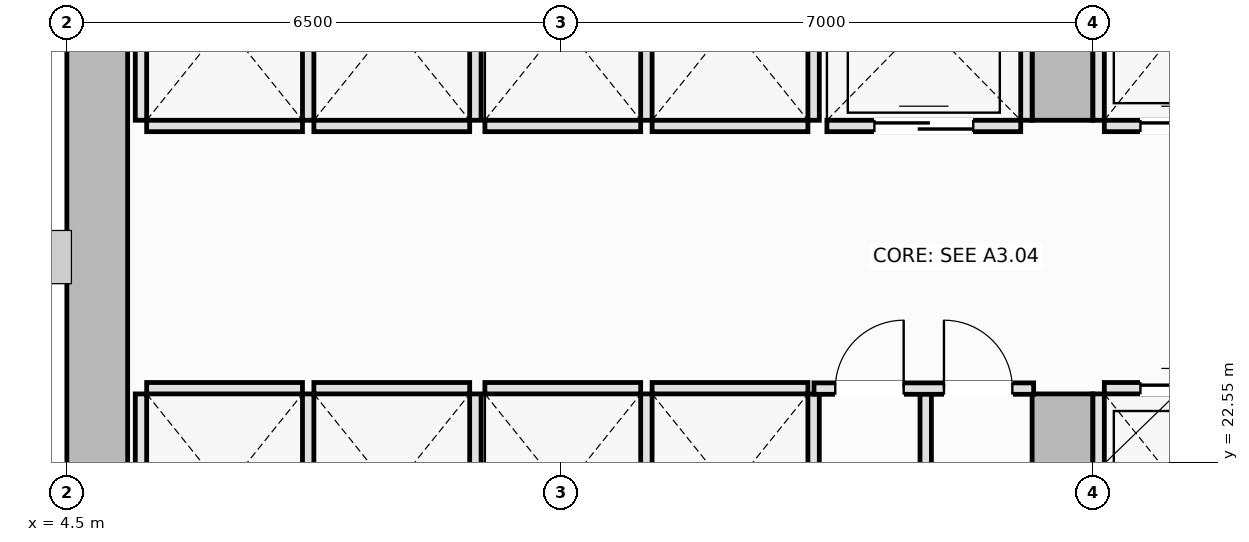
"""IFC4 building model, lengths in metres.
Left out: names, types, materials, properties, quantities, classifications, styles, units other than length and angle.
Written with IfcOpenShell. Run it as: python <this file> out.ifc"""

import sys

from ifc_helpers import new_model, si_unit, direction, frame, frame_2d, origin, place, context, subcontext, project, spatial, rectangle, extrude, element, fill, save


model = new_model("IFC4")
c1 = context("Model", 3, precision=1e-05, world=origin(), true_north=direction((0.0, 1.0)))
c2 = subcontext(c1, "Body", "Model", "MODEL_VIEW")
j1 = project(units=[si_unit("LENGTHUNIT", "METRE"), si_unit("PLANEANGLEUNIT", "RADIAN")], contexts=[c1])
p1 = place(None, origin())
s1 = spatial("IfcSite", under=j1, at=p1, CompositionType="ELEMENT")
p2 = place(p1, origin())
s2 = spatial("IfcBuilding", under=s1, at=p2, CompositionType="ELEMENT")
p3 = place(p2, frame((0.0, 0.0, 89.5)))
s3 = spatial("IfcBuildingStorey", under=s2, at=p3, CompositionType="ELEMENT", Elevation=89.5)
p4 = place(p3, frame((4.9, 14.8, 0.0), z_axis=(0.0, 0.0, 1.0), x_axis=(0.0, 1.0, 0.0)))
e1 = element("IfcWall", 1, at=p4, inside=s3, PredefinedType="SHEAR", context=c2, shape_type="SweptSolid", body=[
    extrude(rectangle(XDim=20.9, YDim=0.8, at=frame_2d((10.45, 0.0))), origin(), (0.0, 0.0, 1.0), 3.55),
])
p5 = place(p3, frame((17.6, 14.8, 0.0), z_axis=(0.0, 0.0, 1.0), x_axis=(0.0, 1.0, 0.0)))
e2 = element("IfcWall", 2, at=p5, inside=s3, PredefinedType="SHEAR", context=c2, shape_type="SweptSolid", body=[
    extrude(rectangle(XDim=8.65, YDim=0.8, at=frame_2d((4.325, 0.0))), origin(), (0.0, 0.0, 1.0), 3.55),
])
p6 = place(p5, frame((4.1, 0.0, 0.0)))
e3 = element("IfcOpeningElement", 3, at=p6, cuts=e2, PredefinedType="OPENING", context=c2, shape_type="SweptSolid", body=[
    extrude(rectangle(XDim=1.1, YDim=2.15, at=frame_2d((0.55, 1.075))), frame((0.0, 0.41, 0.0), z_axis=(0.0, -1.0, 0.0), x_axis=(1.0, 0.0, 0.0)), (0.0, 0.0, 1.0), 0.82),
])
p7 = place(p3, frame((17.6, 27.05, 0.0), z_axis=(0.0, 0.0, 1.0), x_axis=(0.0, 1.0, 0.0)))
e4 = element("IfcWall", 4, at=p7, inside=s3, PredefinedType="SHEAR", context=c2, shape_type="SweptSolid", body=[
    extrude(rectangle(XDim=8.65, YDim=0.8, at=frame_2d((4.325, 0.0))), origin(), (0.0, 0.0, 1.0), 3.55),
])
p8 = place(p7, frame((3.45, 0.0, 0.0)))
e5 = element("IfcOpeningElement", 5, at=p8, cuts=e4, PredefinedType="OPENING", context=c2, shape_type="SweptSolid", body=[
    extrude(rectangle(XDim=1.1, YDim=2.15, at=frame_2d((0.55, 1.075))), frame((0.0, 0.41, 0.0), z_axis=(0.0, -1.0, 0.0), x_axis=(1.0, 0.0, 0.0)), (0.0, 0.0, 1.0), 0.82),
])
p9 = place(p3, frame((18.15, 23.525, 0.0), z_axis=(0.0, 0.0, 1.0), x_axis=(1.0, 0.0, 0.0)))
e6 = element("IfcWall", 6, at=p9, inside=s3, PredefinedType="PARTITIONING", context=c2, shape_type="SweptSolid", body=[
    extrude(rectangle(XDim=2.05, YDim=0.15, at=frame_2d((1.025, 0.0))), origin(), (0.0, 0.0, 1.0), 3.35),
])
p10 = place(p9, frame((0.475, 0.0, 0.0)))
e7 = element("IfcOpeningElement", 7, at=p10, cuts=e6, PredefinedType="OPENING", context=c2, shape_type="SweptSolid", body=[
    extrude(rectangle(XDim=1.1, YDim=2.2, at=frame_2d((0.55, 1.1))), frame((0.0, 0.085, 0.0), z_axis=(0.0, -1.0, 0.0), x_axis=(1.0, 0.0, 0.0)), (0.0, 0.0, 1.0), 0.17),
])
p11 = place(p3, frame((18.075, 20.9, 0.0), z_axis=(0.0, 0.0, 1.0), x_axis=(0.0, 1.0, 0.0)))
e8 = element("IfcWall", 8, at=p11, inside=s3, PredefinedType="PARTITIONING", context=c2, shape_type="SweptSolid", body=[
    extrude(rectangle(XDim=2.55, YDim=0.15, at=frame_2d((1.275, 0.0))), origin(), (0.0, 0.0, 1.0), 3.35),
])
p12 = place(p3, frame((18.15, 26.975, 0.0), z_axis=(0.0, 0.0, 1.0), x_axis=(1.0, 0.0, 0.0)))
e9 = element("IfcWall", 9, at=p12, inside=s3, PredefinedType="PARTITIONING", context=c2, shape_type="SweptSolid", body=[
    extrude(rectangle(XDim=2.05, YDim=0.15, at=frame_2d((1.025, 0.0))), origin(), (0.0, 0.0, 1.0), 3.35),
])
p13 = place(p12, frame((0.475, 0.0, 0.0)))
e10 = element("IfcOpeningElement", 10, at=p13, cuts=e9, PredefinedType="OPENING", context=c2, shape_type="SweptSolid", body=[
    extrude(rectangle(XDim=1.1, YDim=2.2, at=frame_2d((0.55, 1.1))), frame((0.0, 0.085, 0.0), z_axis=(0.0, -1.0, 0.0), x_axis=(1.0, 0.0, 0.0)), (0.0, 0.0, 1.0), 0.17),
])
p14 = place(p3, frame((18.075, 27.05, 0.0), z_axis=(0.0, 0.0, 1.0), x_axis=(0.0, 1.0, 0.0)))
e11 = element("IfcWall", 11, at=p14, inside=s3, PredefinedType="PARTITIONING", context=c2, shape_type="SweptSolid", body=[
    extrude(rectangle(XDim=2.55, YDim=0.15, at=frame_2d((1.275, 0.0))), origin(), (0.0, 0.0, 1.0), 3.35),
])
p15 = place(p3, frame((5.55, 23.525, 0.0), z_axis=(0.0, 0.0, 1.0), x_axis=(1.0, 0.0, 0.0)))
e12 = element("IfcWall", 12, at=p15, inside=s3, PredefinedType="PARTITIONING", context=c2, shape_type="SweptSolid", body=[
    extrude(rectangle(XDim=2.05, YDim=0.15, at=frame_2d((1.025, 0.0))), origin(), (0.0, 0.0, 1.0), 3.35),
])
for number, where, z_axis, x_axis in (
    (13, (5.475, 20.9, 0.0), (0.0, 0.0, 1.0), (0.0, 1.0, 0.0)),
    (14, (7.675, 20.9, 0.0), (0.0, 0.0, 1.0), (0.0, 1.0, 0.0)),
):
    element("IfcWall", number, at=place(p3, frame(where, z_axis=z_axis, x_axis=x_axis)), inside=s3, PredefinedType="PARTITIONING", context=c2, shape_type="SweptSolid", body=[
        extrude(rectangle(XDim=2.55, YDim=0.15, at=frame_2d((1.275, 0.0))), origin(), (0.0, 0.0, 1.0), 3.35),
    ])
p16 = place(p3, frame((7.75, 23.525, 0.0), z_axis=(0.0, 0.0, 1.0), x_axis=(1.0, 0.0, 0.0)))
e15 = element("IfcWall", 15, at=p16, inside=s3, PredefinedType="PARTITIONING", context=c2, shape_type="SweptSolid", body=[
    extrude(rectangle(XDim=2.05, YDim=0.15, at=frame_2d((1.025, 0.0))), origin(), (0.0, 0.0, 1.0), 3.35),
])
p17 = place(p3, frame((9.875, 20.9, 0.0), z_axis=(0.0, 0.0, 1.0), x_axis=(0.0, 1.0, 0.0)))
e16 = element("IfcWall", 16, at=p17, inside=s3, PredefinedType="PARTITIONING", context=c2, shape_type="SweptSolid", body=[
    extrude(rectangle(XDim=2.55, YDim=0.15, at=frame_2d((1.275, 0.0))), origin(), (0.0, 0.0, 1.0), 3.35),
])
p18 = place(p3, frame((5.55, 26.975, 0.0), z_axis=(0.0, 0.0, 1.0), x_axis=(1.0, 0.0, 0.0)))
e17 = element("IfcWall", 17, at=p18, inside=s3, PredefinedType="PARTITIONING", context=c2, shape_type="SweptSolid", body=[
    extrude(rectangle(XDim=2.05, YDim=0.15, at=frame_2d((1.025, 0.0))), origin(), (0.0, 0.0, 1.0), 3.35),
])
for number, where, z_axis, x_axis in (
    (18, (5.475, 27.05, 0.0), (0.0, 0.0, 1.0), (0.0, 1.0, 0.0)),
    (19, (7.675, 27.05, 0.0), (0.0, 0.0, 1.0), (0.0, 1.0, 0.0)),
):
    element("IfcWall", number, at=place(p3, frame(where, z_axis=z_axis, x_axis=x_axis)), inside=s3, PredefinedType="PARTITIONING", context=c2, shape_type="SweptSolid", body=[
        extrude(rectangle(XDim=2.55, YDim=0.15, at=frame_2d((1.275, 0.0))), origin(), (0.0, 0.0, 1.0), 3.35),
    ])
p19 = place(p3, frame((7.75, 26.975, 0.0), z_axis=(0.0, 0.0, 1.0), x_axis=(1.0, 0.0, 0.0)))
e20 = element("IfcWall", 20, at=p19, inside=s3, PredefinedType="PARTITIONING", context=c2, shape_type="SweptSolid", body=[
    extrude(rectangle(XDim=2.05, YDim=0.15, at=frame_2d((1.025, 0.0))), origin(), (0.0, 0.0, 1.0), 3.35),
])
p20 = place(p3, frame((9.875, 27.05, 0.0), z_axis=(0.0, 0.0, 1.0), x_axis=(0.0, 1.0, 0.0)))
e21 = element("IfcWall", 21, at=p20, inside=s3, PredefinedType="PARTITIONING", context=c2, shape_type="SweptSolid", body=[
    extrude(rectangle(XDim=2.55, YDim=0.15, at=frame_2d((1.275, 0.0))), origin(), (0.0, 0.0, 1.0), 3.35),
])
p21 = place(p3, frame((10.0, 23.525, 0.0), z_axis=(0.0, 0.0, 1.0), x_axis=(1.0, 0.0, 0.0)))
e22 = element("IfcWall", 22, at=p21, inside=s3, PredefinedType="PARTITIONING", context=c2, shape_type="SweptSolid", body=[
    extrude(rectangle(XDim=2.05, YDim=0.15, at=frame_2d((1.025, 0.0))), origin(), (0.0, 0.0, 1.0), 3.35),
])
p22 = place(p3, frame((12.125, 20.9, 0.0), z_axis=(0.0, 0.0, 1.0), x_axis=(0.0, 1.0, 0.0)))
e23 = element("IfcWall", 23, at=p22, inside=s3, PredefinedType="PARTITIONING", context=c2, shape_type="SweptSolid", body=[
    extrude(rectangle(XDim=2.55, YDim=0.15, at=frame_2d((1.275, 0.0))), origin(), (0.0, 0.0, 1.0), 3.35),
])
p23 = place(p3, frame((12.2, 23.525, 0.0), z_axis=(0.0, 0.0, 1.0), x_axis=(1.0, 0.0, 0.0)))
e24 = element("IfcWall", 24, at=p23, inside=s3, PredefinedType="PARTITIONING", context=c2, shape_type="SweptSolid", body=[
    extrude(rectangle(XDim=2.05, YDim=0.15, at=frame_2d((1.025, 0.0))), origin(), (0.0, 0.0, 1.0), 3.35),
])
p24 = place(p3, frame((14.325, 20.9, 0.0), z_axis=(0.0, 0.0, 1.0), x_axis=(0.0, 1.0, 0.0)))
e25 = element("IfcWall", 25, at=p24, inside=s3, PredefinedType="PARTITIONING", context=c2, shape_type="SweptSolid", body=[
    extrude(rectangle(XDim=2.55, YDim=0.15, at=frame_2d((1.275, 0.0))), origin(), (0.0, 0.0, 1.0), 3.35),
])
p25 = place(p3, frame((10.0, 26.975, 0.0), z_axis=(0.0, 0.0, 1.0), x_axis=(1.0, 0.0, 0.0)))
e26 = element("IfcWall", 26, at=p25, inside=s3, PredefinedType="PARTITIONING", context=c2, shape_type="SweptSolid", body=[
    extrude(rectangle(XDim=2.05, YDim=0.15, at=frame_2d((1.025, 0.0))), origin(), (0.0, 0.0, 1.0), 3.35),
])
p26 = place(p3, frame((12.125, 27.05, 0.0), z_axis=(0.0, 0.0, 1.0), x_axis=(0.0, 1.0, 0.0)))
e27 = element("IfcWall", 27, at=p26, inside=s3, PredefinedType="PARTITIONING", context=c2, shape_type="SweptSolid", body=[
    extrude(rectangle(XDim=2.55, YDim=0.15, at=frame_2d((1.275, 0.0))), origin(), (0.0, 0.0, 1.0), 3.35),
])
p27 = place(p3, frame((12.2, 26.975, 0.0), z_axis=(0.0, 0.0, 1.0), x_axis=(1.0, 0.0, 0.0)))
e28 = element("IfcWall", 28, at=p27, inside=s3, PredefinedType="PARTITIONING", context=c2, shape_type="SweptSolid", body=[
    extrude(rectangle(XDim=2.05, YDim=0.15, at=frame_2d((1.025, 0.0))), origin(), (0.0, 0.0, 1.0), 3.35),
])
p28 = place(p3, frame((14.325, 27.05, 0.0), z_axis=(0.0, 0.0, 1.0), x_axis=(0.0, 1.0, 0.0)))
e29 = element("IfcWall", 29, at=p28, inside=s3, PredefinedType="PARTITIONING", context=c2, shape_type="SweptSolid", body=[
    extrude(rectangle(XDim=2.55, YDim=0.15, at=frame_2d((1.275, 0.0))), origin(), (0.0, 0.0, 1.0), 3.35),
])
p29 = place(p3, frame((14.5, 26.975, 0.0), z_axis=(0.0, 0.0, 1.0), x_axis=(1.0, 0.0, 0.0)))
e30 = element("IfcWall", 30, at=p29, inside=s3, PredefinedType="PARTITIONING", context=c2, shape_type="SweptSolid", body=[
    extrude(rectangle(XDim=2.55, YDim=0.15, at=frame_2d((1.275, 0.0))), origin(), (0.0, 0.0, 1.0), 3.35),
])
p30 = place(p29, frame((0.625, 0.0, 0.0)))
e31 = element("IfcOpeningElement", 31, at=p30, cuts=e30, PredefinedType="OPENING", context=c2, shape_type="SweptSolid", body=[
    extrude(rectangle(XDim=1.3, YDim=2.2, at=frame_2d((0.65, 1.1))), frame((0.0, 0.085, 0.0), z_axis=(0.0, -1.0, 0.0), x_axis=(1.0, 0.0, 0.0)), (0.0, 0.0, 1.0), 0.17),
])
p31 = place(p3, frame((17.125, 27.05, 0.0), z_axis=(0.0, 0.0, 1.0), x_axis=(0.0, 1.0, 0.0)))
e32 = element("IfcWall", 32, at=p31, inside=s3, PredefinedType="PARTITIONING", context=c2, shape_type="SweptSolid", body=[
    extrude(rectangle(XDim=2.6, YDim=0.15, at=frame_2d((1.3, 0.0))), origin(), (0.0, 0.0, 1.0), 3.35),
])
p32 = place(p3, frame((15.8, 20.85, 0.0), z_axis=(0.0, 0.0, 1.0), x_axis=(0.0, 1.0, 0.0)))
e33 = element("IfcWall", 33, at=p32, inside=s3, PredefinedType="PARTITIONING", context=c2, shape_type="SweptSolid", body=[
    extrude(rectangle(XDim=2.67, YDim=0.15, at=frame_2d((1.335, 0.0))), origin(), (0.0, 0.0, 1.0), 3.35),
])
p33 = place(p3, frame((14.33, 23.52, 0.0), z_axis=(0.0, 0.0, 1.0), x_axis=(1.0, 0.0, 0.0)))
e34 = element("IfcWall", 34, at=p33, inside=s3, PredefinedType="PARTITIONING", context=c2, shape_type="SweptSolid", body=[
    extrude(rectangle(XDim=2.89, YDim=0.15, at=frame_2d((1.445, 0.0))), origin(), (0.0, 0.0, 1.0), 3.35),
])
p34 = place(p33, frame((0.28, 0.0, 0.0)))
e35 = element("IfcOpeningElement", 35, at=p34, cuts=e34, PredefinedType="OPENING", context=c2, shape_type="SweptSolid", body=[
    extrude(rectangle(XDim=0.9, YDim=2.1, at=frame_2d((0.45, 1.05))), frame((0.0, 0.085, 0.0), z_axis=(0.0, -1.0, 0.0), x_axis=(1.0, 0.0, 0.0)), (0.0, 0.0, 1.0), 0.17),
])
p35 = place(p33, frame((1.71, 0.0, 0.0)))
e36 = element("IfcOpeningElement", 36, at=p35, cuts=e34, PredefinedType="OPENING", context=c2, shape_type="SweptSolid", body=[
    extrude(rectangle(XDim=0.9, YDim=2.1, at=frame_2d((0.45, 1.05))), frame((0.0, 0.085, 0.0), z_axis=(0.0, -1.0, 0.0), x_axis=(1.0, 0.0, 0.0)), (0.0, 0.0, 1.0), 0.17),
])
p36 = place(p10, origin())
e37 = element("IfcDoor", 37, at=p36, inside=s3, OperationType="DOUBLE_DOOR_SLIDING", PredefinedType="DOOR", context=c2, shape_type="SweptSolid", body=[
    extrude(rectangle(XDim=1.1, YDim=2.2, at=frame_2d((0.55, 1.1))), frame((0.0, 0.025, 0.0), z_axis=(0.0, -1.0, 0.0), x_axis=(1.0, 0.0, 0.0)), (0.0, 0.0, 1.0), 0.05),
])
fill(e7, e37)
p37 = place(p13, origin())
e38 = element("IfcDoor", 38, at=p37, inside=s3, OperationType="DOUBLE_DOOR_SLIDING", PredefinedType="DOOR", context=c2, shape_type="SweptSolid", body=[
    extrude(rectangle(XDim=1.1, YDim=2.2, at=frame_2d((0.55, 1.1))), frame((0.0, 0.025, 0.0), z_axis=(0.0, -1.0, 0.0), x_axis=(1.0, 0.0, 0.0)), (0.0, 0.0, 1.0), 0.05),
])
fill(e10, e38)
p38 = place(p30, origin())
e39 = element("IfcDoor", 39, at=p38, inside=s3, OperationType="DOUBLE_DOOR_SLIDING", PredefinedType="DOOR", context=c2, shape_type="SweptSolid", body=[
    extrude(rectangle(XDim=1.3, YDim=2.2, at=frame_2d((0.65, 1.1))), frame((0.0, 0.025, 0.0), z_axis=(0.0, -1.0, 0.0), x_axis=(1.0, 0.0, 0.0)), (0.0, 0.0, 1.0), 0.05),
])
fill(e31, e39)
p39 = place(p34, origin())
e40 = element("IfcDoor", 40, at=p39, inside=s3, OperationType="SINGLE_SWING_RIGHT", PredefinedType="DOOR", context=c2, shape_type="SweptSolid", body=[
    extrude(rectangle(XDim=0.9, YDim=2.1, at=frame_2d((0.45, 1.05))), frame((0.0, 0.025, 0.0), z_axis=(0.0, -1.0, 0.0), x_axis=(1.0, 0.0, 0.0)), (0.0, 0.0, 1.0), 0.05),
])
fill(e35, e40)
p40 = place(p35, origin())
e41 = element("IfcDoor", 41, at=p40, inside=s3, OperationType="SINGLE_SWING_LEFT", PredefinedType="DOOR", context=c2, shape_type="SweptSolid", body=[
    extrude(rectangle(XDim=0.9, YDim=2.1, at=frame_2d((0.45, 1.05))), frame((0.0, 0.025, 0.0), z_axis=(0.0, -1.0, 0.0), x_axis=(1.0, 0.0, 0.0)), (0.0, 0.0, 1.0), 0.05),
])
fill(e36, e41)
save(model, sys.argv[1])
